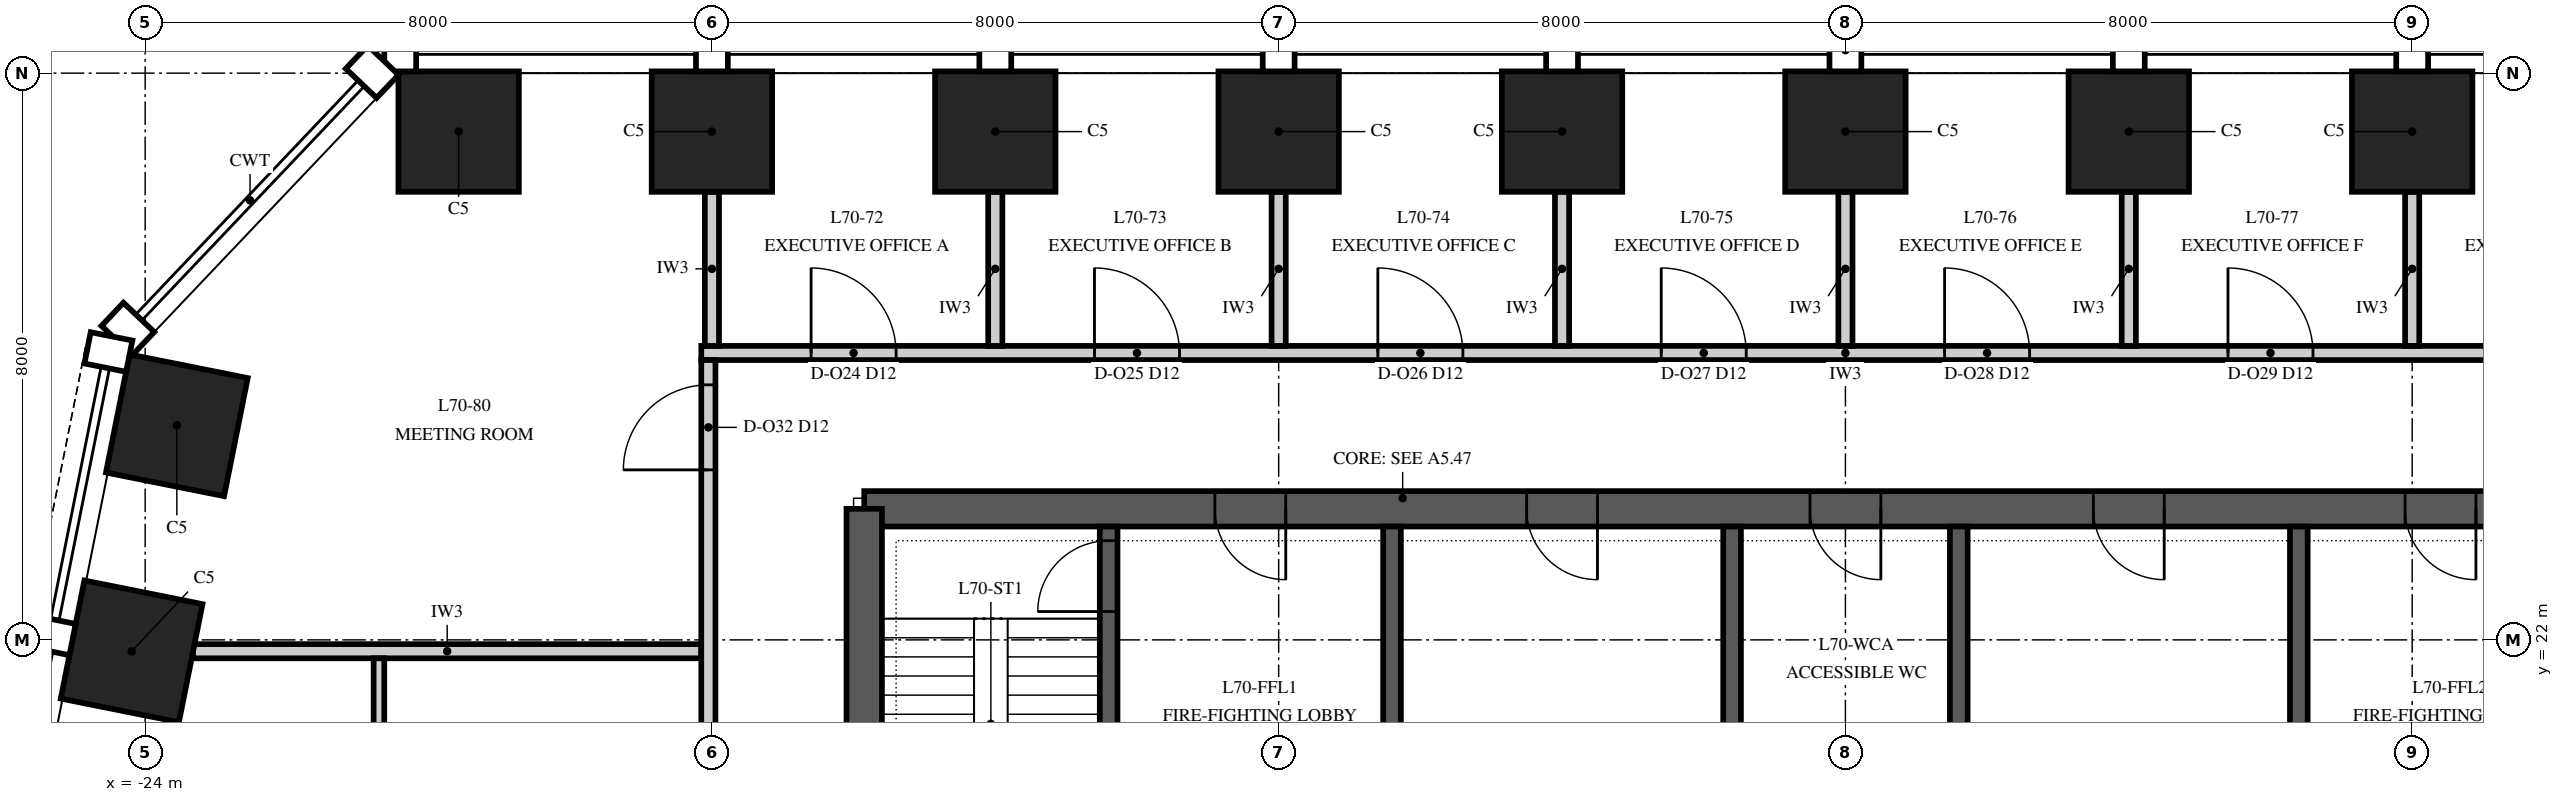
"""IFC4 building model, lengths in metres.
Left out: names, types, materials, properties, quantities, classifications, styles, units other than length and angle.
Written with IfcOpenShell. Run it as: python <this file> out.ifc"""

import sys

from ifc_helpers import new_model, si_unit, direction, frame, frame_2d, origin, origin_2d, place, context, subcontext, project, spatial, polyline, rectangle, outline, extrude, element, fill, save


model = new_model("IFC4")
c1 = context("Model", 3, precision=1e-05, world=origin(), true_north=direction((0.0, 1.0)))
c2 = subcontext(c1, "Body", "Model", "MODEL_VIEW")
j1 = project(units=[si_unit("LENGTHUNIT", "METRE"), si_unit("PLANEANGLEUNIT", "RADIAN")], contexts=[c1])
p1 = place(None, origin())
s1 = spatial("IfcSite", under=j1, at=p1, CompositionType="ELEMENT")
p2 = place(p1, origin())
s2 = spatial("IfcBuilding", under=s1, at=p2, CompositionType="ELEMENT")
p3 = place(p2, frame((0.0, 0.0, 300.0)))
s3 = spatial("IfcBuildingStorey", under=s2, at=p3, CompositionType="ELEMENT", Elevation=300.0)
for number, where, z_axis, x_axis in (
    (1, (8.0, 29.175, 0.0), (0.0, 0.0, 1.0), (-1.0, 0.0, 0.0)),
    (2, (4.0, 29.175, 0.0), (0.0, 0.0, 1.0), (-1.0, 0.0, 0.0)),
    (3, (0.0, 29.175, 0.0), (0.0, 0.0, 1.0), (-1.0, 0.0, 0.0)),
    (4, (-4.0, 29.175, 0.0), (0.0, 0.0, 1.0), (-1.0, 0.0, 0.0)),
    (5, (-8.0, 29.175, 0.0), (0.0, 0.0, 1.0), (-1.0, 0.0, 0.0)),
    (6, (-12.0, 29.175, 0.0), (0.0, 0.0, 1.0), (-1.0, 0.0, 0.0)),
    (7, (-16.0, 29.175, 0.0), (0.0, 0.0, 1.0), (-1.0, 0.0, 0.0)),
    (8, (-19.575, 29.175, 0.0), (0.0, 0.0, 1.0), (-1.0, 0.0, 0.0)),
    (9, (-23.553, 25.029, 0.0), (0.0, 0.0, 1.0), (-0.196, -0.981, 0.0)),
    (10, (-24.191, 21.838, 0.0), (0.0, 0.0, 1.0), (-0.196, -0.981, 0.0)),
):
    element("IfcColumn", number, at=place(p3, frame(where, z_axis=z_axis, x_axis=x_axis)), inside=s3, PredefinedType="COLUMN", context=c2, shape_type="SweptSolid", body=[
        extrude(rectangle(XDim=1.7, YDim=1.7, at=origin_2d()), origin(), (0.0, 0.0, 1.0), 4.0),
    ])
p4 = place(p3, frame((13.85, 23.85, 0.0), z_axis=(0.0, 0.0, 1.0), x_axis=(-1.0, 0.0, 0.0)))
e11 = element("IfcWall", 11, at=p4, inside=s3, PredefinedType="SHEAR", context=c2, shape_type="SweptSolid", body=[
    extrude(rectangle(XDim=27.7, YDim=0.5, at=frame_2d((13.85, 0.0))), origin(), (0.0, 0.0, 1.0), 4.0),
])
p5 = place(p4, frame((21.75, 0.0, 0.0)))
e12 = element("IfcOpeningElement", 12, at=p5, cuts=e11, PredefinedType="OPENING", context=c2, shape_type="SweptSolid", body=[
    extrude(rectangle(XDim=1.0, YDim=2.1, at=frame_2d((0.5, 1.05))), frame((0.0, 0.265, 0.0), z_axis=(0.0, -1.0, 0.0), x_axis=(1.0, 0.0, 0.0)), (0.0, 0.0, 1.0), 0.53),
])
p6 = place(p4, frame((4.95, 0.0, 0.0)))
e13 = element("IfcOpeningElement", 13, at=p6, cuts=e11, PredefinedType="OPENING", context=c2, shape_type="SweptSolid", body=[
    extrude(rectangle(XDim=1.0, YDim=2.1, at=frame_2d((0.5, 1.05))), frame((0.0, 0.265, 0.0), z_axis=(0.0, -1.0, 0.0), x_axis=(1.0, 0.0, 0.0)), (0.0, 0.0, 1.0), 0.53),
])
p7 = place(p4, frame((17.35, 0.0, 0.0)))
e14 = element("IfcOpeningElement", 14, at=p7, cuts=e11, PredefinedType="OPENING", context=c2, shape_type="SweptSolid", body=[
    extrude(rectangle(XDim=1.0, YDim=2.1, at=frame_2d((0.5, 1.05))), frame((0.0, 0.265, 0.0), z_axis=(0.0, -1.0, 0.0), x_axis=(1.0, 0.0, 0.0)), (0.0, 0.0, 1.0), 0.53),
])
p8 = place(p4, frame((13.35, 0.0, 0.0)))
e15 = element("IfcOpeningElement", 15, at=p8, cuts=e11, PredefinedType="OPENING", context=c2, shape_type="SweptSolid", body=[
    extrude(rectangle(XDim=1.0, YDim=2.1, at=frame_2d((0.5, 1.05))), frame((0.0, 0.265, 0.0), z_axis=(0.0, -1.0, 0.0), x_axis=(1.0, 0.0, 0.0)), (0.0, 0.0, 1.0), 0.53),
])
p9 = place(p4, frame((9.35, 0.0, 0.0)))
e16 = element("IfcOpeningElement", 16, at=p9, cuts=e11, PredefinedType="OPENING", context=c2, shape_type="SweptSolid", body=[
    extrude(rectangle(XDim=1.0, YDim=2.1, at=frame_2d((0.5, 1.05))), frame((0.0, 0.265, 0.0), z_axis=(0.0, -1.0, 0.0), x_axis=(1.0, 0.0, 0.0)), (0.0, 0.0, 1.0), 0.53),
])
p10 = place(p3, frame((-13.85, 23.85, 0.0), z_axis=(0.0, 0.0, 1.0), x_axis=(0.0, -1.0, 0.0)))
e17 = element("IfcWall", 17, at=p10, inside=s3, PredefinedType="SHEAR", context=c2, shape_type="SweptSolid", body=[
    extrude(outline(polyline([(0.0, -0.25), (17.7, -0.25), (17.7, 0.0), (17.45, 0.0), (17.45, 0.25), (0.25, 0.25), (0.25, 0.0), (0.0, 0.0), (0.0, -0.25)])), origin(), (0.0, 0.0, 1.0), 4.0),
])
p11 = place(p10, frame((11.75, 0.0, 0.0)))
e18 = element("IfcOpeningElement", 18, at=p11, cuts=e17, PredefinedType="OPENING", context=c2, shape_type="SweptSolid", body=[
    extrude(rectangle(XDim=1.8, YDim=2.4, at=frame_2d((0.9, 1.2))), frame((0.0, 0.265, 0.0), z_axis=(0.0, -1.0, 0.0), x_axis=(1.0, 0.0, 0.0)), (0.0, 0.0, 1.0), 0.53),
])
p12 = place(p3, frame((-10.4, 16.125, 0.0), z_axis=(0.0, 0.0, 1.0), x_axis=(0.0, 1.0, 0.0)))
e19 = element("IfcWall", 19, at=p12, inside=s3, PredefinedType="SHEAR", context=c2, shape_type="SweptSolid", body=[
    extrude(rectangle(XDim=7.475, YDim=0.25, at=frame_2d((3.738, 0.0))), origin(), (0.0, 0.0, 1.0), 4.0),
])
p13 = place(p12, frame((6.275, 0.0, 0.0)))
e20 = element("IfcOpeningElement", 20, at=p13, cuts=e19, PredefinedType="OPENING", context=c2, shape_type="SweptSolid", body=[
    extrude(rectangle(XDim=1.0, YDim=2.1, at=frame_2d((0.5, 1.05))), frame((0.0, 0.14, 0.0), z_axis=(0.0, -1.0, 0.0), x_axis=(1.0, 0.0, 0.0)), (0.0, 0.0, 1.0), 0.28),
])
for number, where, z_axis, x_axis in (
    (21, (-6.4, 16.125, 0.0), (0.0, 0.0, 1.0), (0.0, 1.0, 0.0)),
    (22, (-1.6, 16.125, 0.0), (0.0, 0.0, 1.0), (0.0, 1.0, 0.0)),
    (23, (1.6, 16.125, 0.0), (0.0, 0.0, 1.0), (0.0, 1.0, 0.0)),
    (24, (6.4, 16.125, 0.0), (0.0, 0.0, 1.0), (0.0, 1.0, 0.0)),
):
    element("IfcWall", number, at=place(p3, frame(where, z_axis=z_axis, x_axis=x_axis)), inside=s3, PredefinedType="SHEAR", context=c2, shape_type="SweptSolid", body=[
        extrude(rectangle(XDim=7.475, YDim=0.25, at=frame_2d((3.738, 0.0))), origin(), (0.0, 0.0, 1.0), 4.0),
    ])
p14 = place(p3, frame((-23.324, 21.84, 0.0), z_axis=(0.0, 0.0, 1.0), x_axis=(1.0, 0.0, 0.0)))
e25 = element("IfcWall", 25, at=p14, inside=s3, PredefinedType="PARTITIONING", context=c2, shape_type="SweptSolid", body=[
    extrude(rectangle(XDim=7.174, YDim=0.2, at=frame_2d((3.587, 0.0))), origin(), (0.0, 0.0, 1.0), 3.23),
])
p15 = place(p3, frame((-16.15, 26.05, 0.0), z_axis=(0.0, 0.0, 1.0), x_axis=(1.0, 0.0, 0.0)))
e26 = element("IfcWall", 26, at=p15, inside=s3, PredefinedType="PARTITIONING", context=c2, shape_type="SweptSolid", body=[
    extrude(rectangle(XDim=32.3, YDim=0.2, at=frame_2d((16.15, 0.0))), origin(), (0.0, 0.0, 1.0), 3.418),
])
p16 = place(p15, frame((1.55, 0.0, 0.0)))
e27 = element("IfcOpeningElement", 27, at=p16, cuts=e26, PredefinedType="OPENING", context=c2, shape_type="SweptSolid", body=[
    extrude(rectangle(XDim=1.2, YDim=2.4, at=frame_2d((0.6, 1.2))), frame((0.0, 0.115, 0.0), z_axis=(0.0, -1.0, 0.0), x_axis=(1.0, 0.0, 0.0)), (0.0, 0.0, 1.0), 0.23),
])
p17 = place(p15, frame((5.55, 0.0, 0.0)))
e28 = element("IfcOpeningElement", 28, at=p17, cuts=e26, PredefinedType="OPENING", context=c2, shape_type="SweptSolid", body=[
    extrude(rectangle(XDim=1.2, YDim=2.4, at=frame_2d((0.6, 1.2))), frame((0.0, 0.115, 0.0), z_axis=(0.0, -1.0, 0.0), x_axis=(1.0, 0.0, 0.0)), (0.0, 0.0, 1.0), 0.23),
])
p18 = place(p15, frame((9.55, 0.0, 0.0)))
e29 = element("IfcOpeningElement", 29, at=p18, cuts=e26, PredefinedType="OPENING", context=c2, shape_type="SweptSolid", body=[
    extrude(rectangle(XDim=1.2, YDim=2.4, at=frame_2d((0.6, 1.2))), frame((0.0, 0.115, 0.0), z_axis=(0.0, -1.0, 0.0), x_axis=(1.0, 0.0, 0.0)), (0.0, 0.0, 1.0), 0.23),
])
p19 = place(p15, frame((13.55, 0.0, 0.0)))
e30 = element("IfcOpeningElement", 30, at=p19, cuts=e26, PredefinedType="OPENING", context=c2, shape_type="SweptSolid", body=[
    extrude(rectangle(XDim=1.2, YDim=2.4, at=frame_2d((0.6, 1.2))), frame((0.0, 0.115, 0.0), z_axis=(0.0, -1.0, 0.0), x_axis=(1.0, 0.0, 0.0)), (0.0, 0.0, 1.0), 0.23),
])
p20 = place(p15, frame((17.55, 0.0, 0.0)))
e31 = element("IfcOpeningElement", 31, at=p20, cuts=e26, PredefinedType="OPENING", context=c2, shape_type="SweptSolid", body=[
    extrude(rectangle(XDim=1.2, YDim=2.4, at=frame_2d((0.6, 1.2))), frame((0.0, 0.115, 0.0), z_axis=(0.0, -1.0, 0.0), x_axis=(1.0, 0.0, 0.0)), (0.0, 0.0, 1.0), 0.23),
])
p21 = place(p15, frame((21.55, 0.0, 0.0)))
e32 = element("IfcOpeningElement", 32, at=p21, cuts=e26, PredefinedType="OPENING", context=c2, shape_type="SweptSolid", body=[
    extrude(rectangle(XDim=1.2, YDim=2.4, at=frame_2d((0.6, 1.2))), frame((0.0, 0.115, 0.0), z_axis=(0.0, -1.0, 0.0), x_axis=(1.0, 0.0, 0.0)), (0.0, 0.0, 1.0), 0.23),
])
p22 = place(p15, frame((25.55, 0.0, 0.0)))
e33 = element("IfcOpeningElement", 33, at=p22, cuts=e26, PredefinedType="OPENING", context=c2, shape_type="SweptSolid", body=[
    extrude(rectangle(XDim=1.2, YDim=2.4, at=frame_2d((0.6, 1.2))), frame((0.0, 0.115, 0.0), z_axis=(0.0, -1.0, 0.0), x_axis=(1.0, 0.0, 0.0)), (0.0, 0.0, 1.0), 0.23),
])
p23 = place(p15, frame((29.55, 0.0, 0.0)))
e34 = element("IfcOpeningElement", 34, at=p23, cuts=e26, PredefinedType="OPENING", context=c2, shape_type="SweptSolid", body=[
    extrude(rectangle(XDim=1.2, YDim=2.4, at=frame_2d((0.6, 1.2))), frame((0.0, 0.115, 0.0), z_axis=(0.0, -1.0, 0.0), x_axis=(1.0, 0.0, 0.0)), (0.0, 0.0, 1.0), 0.23),
])
p24 = place(p3, frame((-20.7, 17.915, 0.0), z_axis=(0.0, 0.0, 1.0), x_axis=(0.0, 1.0, 0.0)))
e35 = element("IfcWall", 35, at=p24, inside=s3, PredefinedType="PARTITIONING", context=c2, shape_type="SweptSolid", body=[
    extrude(rectangle(XDim=3.825, YDim=0.15, at=frame_2d((1.913, 0.0))), origin(), (0.0, 0.0, 1.0), 3.23),
])
p25 = place(p24, frame((1.425, 0.0, 0.0)))
e36 = element("IfcOpeningElement", 36, at=p25, cuts=e35, PredefinedType="OPENING", context=c2, shape_type="SweptSolid", body=[
    extrude(rectangle(XDim=1.0, YDim=2.3, at=frame_2d((0.5, 1.15))), frame((0.0, 0.09, 0.0), z_axis=(0.0, -1.0, 0.0), x_axis=(1.0, 0.0, 0.0)), (0.0, 0.0, 1.0), 0.18),
])
p26 = place(p3, frame((-16.05, 4.05, 0.0), z_axis=(0.0, 0.0, 1.0), x_axis=(0.0, 1.0, 0.0)))
e37 = element("IfcWall", 37, at=p26, inside=s3, PredefinedType="PARTITIONING", context=c2, shape_type="SweptSolid", body=[
    extrude(rectangle(XDim=21.9, YDim=0.2, at=frame_2d((10.95, 0.0))), origin(), (0.0, 0.0, 1.0), 2.842),
])
p27 = place(p26, frame((0.25, 0.0, 0.0)))
e38 = element("IfcOpeningElement", 38, at=p27, cuts=e37, PredefinedType="OPENING", context=c2, shape_type="SweptSolid", body=[
    extrude(rectangle(XDim=1.2, YDim=2.4, at=frame_2d((0.6, 1.2))), frame((0.0, 0.115, 0.0), z_axis=(0.0, -1.0, 0.0), x_axis=(1.0, 0.0, 0.0)), (0.0, 0.0, 1.0), 0.23),
])
p28 = place(p26, frame((7.35, 0.0, 0.0)))
e39 = element("IfcOpeningElement", 39, at=p28, cuts=e37, PredefinedType="OPENING", context=c2, shape_type="SweptSolid", body=[
    extrude(rectangle(XDim=1.2, YDim=2.4, at=frame_2d((0.6, 1.2))), frame((0.0, 0.115, 0.0), z_axis=(0.0, -1.0, 0.0), x_axis=(1.0, 0.0, 0.0)), (0.0, 0.0, 1.0), 0.23),
])
p29 = place(p26, frame((20.35, 0.0, 0.0)))
e40 = element("IfcOpeningElement", 40, at=p29, cuts=e37, PredefinedType="OPENING", context=c2, shape_type="SweptSolid", body=[
    extrude(rectangle(XDim=1.2, YDim=2.4, at=frame_2d((0.6, 1.2))), frame((0.0, 0.115, 0.0), z_axis=(0.0, -1.0, 0.0), x_axis=(1.0, 0.0, 0.0)), (0.0, 0.0, 1.0), 0.23),
])
for number, where, z_axis, x_axis in (
    (41, (-16.0, 26.15, 0.0), (0.0, 0.0, 1.0), (0.0, 1.0, 0.0)),
    (42, (-12.0, 26.15, 0.0), (0.0, 0.0, 1.0), (0.0, 1.0, 0.0)),
    (43, (-8.0, 26.15, 0.0), (0.0, 0.0, 1.0), (0.0, 1.0, 0.0)),
    (44, (-4.0, 26.15, 0.0), (0.0, 0.0, 1.0), (0.0, 1.0, 0.0)),
    (45, (0.0, 26.15, 0.0), (0.0, 0.0, 1.0), (0.0, 1.0, 0.0)),
    (46, (4.0, 26.15, 0.0), (0.0, 0.0, 1.0), (0.0, 1.0, 0.0)),
    (47, (8.0, 26.15, 0.0), (0.0, 0.0, 1.0), (0.0, 1.0, 0.0)),
):
    element("IfcWall", number, at=place(p3, frame(where, z_axis=z_axis, x_axis=x_axis)), inside=s3, PredefinedType="PARTITIONING", context=c2, shape_type="SweptSolid", body=[
        extrude(rectangle(XDim=2.175, YDim=0.2, at=frame_2d((1.087, 0.0))), origin(), (0.0, 0.0, 1.0), 3.418),
    ])
p30 = place(p5, origin())
e48 = element("IfcDoor", 48, at=p30, inside=s3, OperationType="SINGLE_SWING_RIGHT", PredefinedType="DOOR", context=c2, shape_type="SweptSolid", body=[
    extrude(rectangle(XDim=1.0, YDim=2.1, at=frame_2d((0.5, 1.05))), frame((0.0, 0.25, 0.0), z_axis=(0.0, -1.0, 0.0), x_axis=(1.0, 0.0, 0.0)), (0.0, 0.0, 1.0), 0.5),
])
fill(e12, e48)
p31 = place(p6, origin())
e49 = element("IfcDoor", 49, at=p31, inside=s3, OperationType="SINGLE_SWING_RIGHT", PredefinedType="DOOR", context=c2, shape_type="SweptSolid", body=[
    extrude(rectangle(XDim=1.0, YDim=2.1, at=frame_2d((0.5, 1.05))), frame((0.0, 0.25, 0.0), z_axis=(0.0, -1.0, 0.0), x_axis=(1.0, 0.0, 0.0)), (0.0, 0.0, 1.0), 0.5),
])
fill(e13, e49)
p32 = place(p7, origin())
e50 = element("IfcDoor", 50, at=p32, inside=s3, OperationType="SINGLE_SWING_LEFT", PredefinedType="DOOR", context=c2, shape_type="SweptSolid", body=[
    extrude(rectangle(XDim=1.0, YDim=2.1, at=frame_2d((0.5, 1.05))), frame((0.0, 0.25, 0.0), z_axis=(0.0, -1.0, 0.0), x_axis=(1.0, 0.0, 0.0)), (0.0, 0.0, 1.0), 0.5),
])
fill(e14, e50)
p33 = place(p8, origin())
e51 = element("IfcDoor", 51, at=p33, inside=s3, OperationType="SINGLE_SWING_LEFT", PredefinedType="DOOR", context=c2, shape_type="SweptSolid", body=[
    extrude(rectangle(XDim=1.0, YDim=2.1, at=frame_2d((0.5, 1.05))), frame((0.0, 0.25, 0.0), z_axis=(0.0, -1.0, 0.0), x_axis=(1.0, 0.0, 0.0)), (0.0, 0.0, 1.0), 0.5),
])
fill(e15, e51)
p34 = place(p9, origin())
e52 = element("IfcDoor", 52, at=p34, inside=s3, OperationType="SINGLE_SWING_LEFT", PredefinedType="DOOR", context=c2, shape_type="SweptSolid", body=[
    extrude(rectangle(XDim=1.0, YDim=2.1, at=frame_2d((0.5, 1.05))), frame((0.0, 0.25, 0.0), z_axis=(0.0, -1.0, 0.0), x_axis=(1.0, 0.0, 0.0)), (0.0, 0.0, 1.0), 0.5),
])
fill(e16, e52)
p35 = place(p13, origin())
e53 = element("IfcDoor", 53, at=p35, inside=s3, OperationType="SINGLE_SWING_LEFT", PredefinedType="DOOR", context=c2, shape_type="SweptSolid", body=[
    extrude(rectangle(XDim=1.0, YDim=2.1, at=frame_2d((0.5, 1.05))), frame((0.0, 0.125, 0.0), z_axis=(0.0, -1.0, 0.0), x_axis=(1.0, 0.0, 0.0)), (0.0, 0.0, 1.0), 0.25),
])
fill(e20, e53)
p36 = place(p16, origin())
e54 = element("IfcDoor", 54, at=p36, inside=s3, OperationType="SINGLE_SWING_LEFT", PredefinedType="DOOR", context=c2, shape_type="SweptSolid", body=[
    extrude(rectangle(XDim=1.2, YDim=2.4, at=frame_2d((0.6, 1.2))), frame((0.0, 0.1, 0.0), z_axis=(0.0, -1.0, 0.0), x_axis=(1.0, 0.0, 0.0)), (0.0, 0.0, 1.0), 0.199),
])
fill(e27, e54)
p37 = place(p17, origin())
e55 = element("IfcDoor", 55, at=p37, inside=s3, OperationType="SINGLE_SWING_LEFT", PredefinedType="DOOR", context=c2, shape_type="SweptSolid", body=[
    extrude(rectangle(XDim=1.2, YDim=2.4, at=frame_2d((0.6, 1.2))), frame((0.0, 0.1, 0.0), z_axis=(0.0, -1.0, 0.0), x_axis=(1.0, 0.0, 0.0)), (0.0, 0.0, 1.0), 0.199),
])
fill(e28, e55)
p38 = place(p18, origin())
e56 = element("IfcDoor", 56, at=p38, inside=s3, OperationType="SINGLE_SWING_LEFT", PredefinedType="DOOR", context=c2, shape_type="SweptSolid", body=[
    extrude(rectangle(XDim=1.2, YDim=2.4, at=frame_2d((0.6, 1.2))), frame((0.0, 0.1, 0.0), z_axis=(0.0, -1.0, 0.0), x_axis=(1.0, 0.0, 0.0)), (0.0, 0.0, 1.0), 0.199),
])
fill(e29, e56)
p39 = place(p19, origin())
e57 = element("IfcDoor", 57, at=p39, inside=s3, OperationType="SINGLE_SWING_LEFT", PredefinedType="DOOR", context=c2, shape_type="SweptSolid", body=[
    extrude(rectangle(XDim=1.2, YDim=2.4, at=frame_2d((0.6, 1.2))), frame((0.0, 0.1, 0.0), z_axis=(0.0, -1.0, 0.0), x_axis=(1.0, 0.0, 0.0)), (0.0, 0.0, 1.0), 0.199),
])
fill(e30, e57)
p40 = place(p20, origin())
e58 = element("IfcDoor", 58, at=p40, inside=s3, OperationType="SINGLE_SWING_LEFT", PredefinedType="DOOR", context=c2, shape_type="SweptSolid", body=[
    extrude(rectangle(XDim=1.2, YDim=2.4, at=frame_2d((0.6, 1.2))), frame((0.0, 0.1, 0.0), z_axis=(0.0, -1.0, 0.0), x_axis=(1.0, 0.0, 0.0)), (0.0, 0.0, 1.0), 0.199),
])
fill(e31, e58)
p41 = place(p21, origin())
e59 = element("IfcDoor", 59, at=p41, inside=s3, OperationType="SINGLE_SWING_LEFT", PredefinedType="DOOR", context=c2, shape_type="SweptSolid", body=[
    extrude(rectangle(XDim=1.2, YDim=2.4, at=frame_2d((0.6, 1.2))), frame((0.0, 0.1, 0.0), z_axis=(0.0, -1.0, 0.0), x_axis=(1.0, 0.0, 0.0)), (0.0, 0.0, 1.0), 0.199),
])
fill(e32, e59)
p42 = place(p29, origin())
e60 = element("IfcDoor", 60, at=p42, inside=s3, OperationType="SINGLE_SWING_LEFT", PredefinedType="DOOR", context=c2, shape_type="SweptSolid", body=[
    extrude(rectangle(XDim=1.2, YDim=2.4, at=frame_2d((0.6, 1.2))), frame((0.0, 0.1, 0.0), z_axis=(0.0, -1.0, 0.0), x_axis=(1.0, 0.0, 0.0)), (0.0, 0.0, 1.0), 0.199),
])
fill(e40, e60)
save(model, sys.argv[1])
